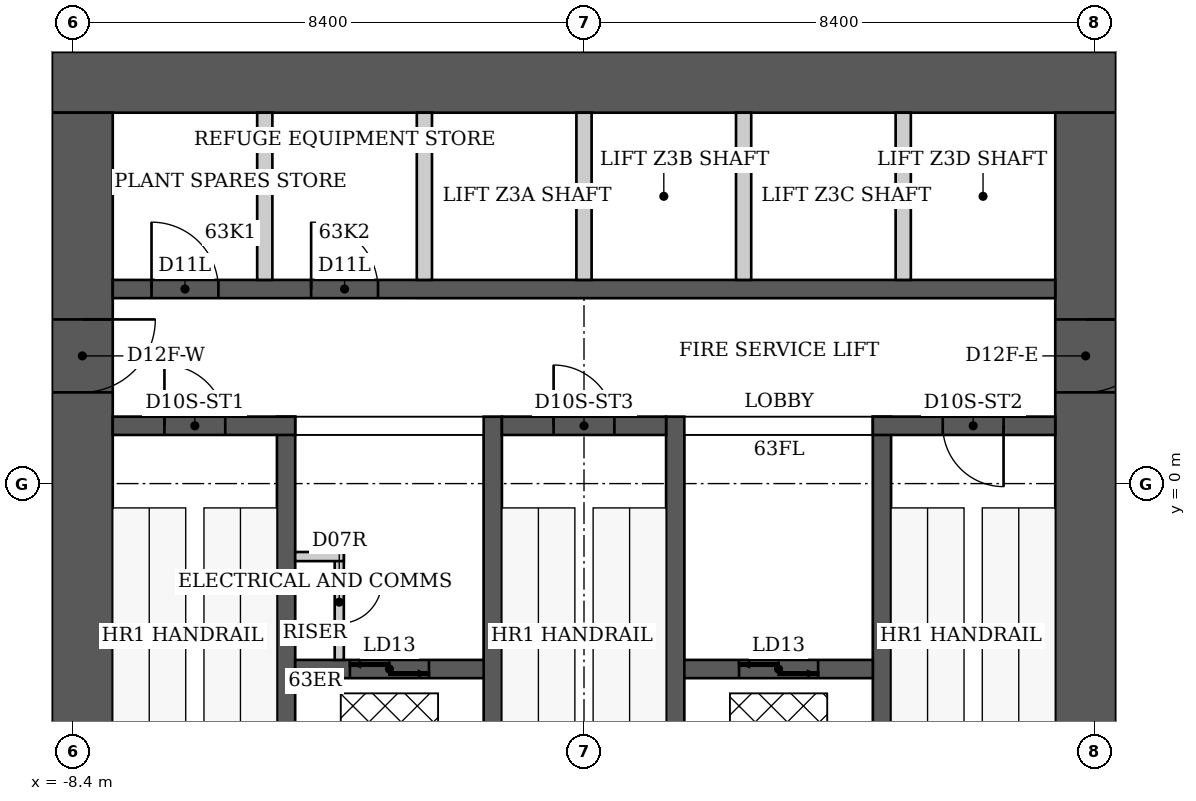
"""IFC4 building model, lengths in metres.
Left out: names, types, materials, properties, quantities, classifications, styles, units other than length and angle.
Written with IfcOpenShell. Run it as: python <this file> out.ifc"""

import sys

from ifc_helpers import new_model, si_unit, direction, frame, frame_2d, origin, place, context, subcontext, project, spatial, rectangle, extrude, element, fill, save


model = new_model("IFC4")
c1 = context("Model", 3, precision=1e-05, world=origin(), true_north=direction((0.0, 1.0)))
c2 = subcontext(c1, "Body", "Model", "MODEL_VIEW")
j1 = project(units=[si_unit("LENGTHUNIT", "METRE"), si_unit("PLANEANGLEUNIT", "RADIAN")], contexts=[c1])
p1 = place(None, origin())
s1 = spatial("IfcSite", under=j1, at=p1, CompositionType="ELEMENT")
p2 = place(p1, origin())
s2 = spatial("IfcBuilding", under=s1, at=p2, CompositionType="ELEMENT")
p3 = place(p2, frame((0.0, 0.0, 251.6)))
s3 = spatial("IfcBuildingStorey", under=s2, at=p3, CompositionType="ELEMENT", Elevation=251.6)
p4 = place(p3, frame((-8.75, 6.6, 0.0), z_axis=(0.0, 0.0, 1.0), x_axis=(1.0, 0.0, 0.0)))
e1 = element("IfcWall", 1, at=p4, inside=s3, PredefinedType="SHEAR", context=c2, shape_type="SweptSolid", body=[
    extrude(rectangle(XDim=17.5, YDim=1.0, at=frame_2d((8.75, 0.0))), origin(), (0.0, 0.0, 1.0), 5.4),
])
p5 = place(p3, frame((-8.25, -6.1, 0.0), z_axis=(0.0, 0.0, 1.0), x_axis=(0.0, 1.0, 0.0)))
e2 = element("IfcWall", 2, at=p5, inside=s3, PredefinedType="SHEAR", context=c2, shape_type="SweptSolid", body=[
    extrude(rectangle(XDim=12.2, YDim=1.0, at=frame_2d((6.1, 0.0))), origin(), (0.0, 0.0, 1.0), 5.4),
])
p6 = place(p5, frame((7.6, 0.0, 0.0)))
e3 = element("IfcOpeningElement", 3, at=p6, cuts=e2, PredefinedType="OPENING", context=c2, shape_type="SweptSolid", body=[
    extrude(rectangle(XDim=1.2, YDim=2.2, at=frame_2d((0.6, 1.1))), frame((0.0, 0.5, 0.0), z_axis=(0.0, -1.0, 0.0), x_axis=(1.0, 0.0, 0.0)), (0.0, 0.0, 1.0), 1.0),
])
p7 = place(p3, frame((8.25, -6.1, 0.0), z_axis=(0.0, 0.0, 1.0), x_axis=(0.0, 1.0, 0.0)))
e4 = element("IfcWall", 4, at=p7, inside=s3, PredefinedType="SHEAR", context=c2, shape_type="SweptSolid", body=[
    extrude(rectangle(XDim=12.2, YDim=1.0, at=frame_2d((6.1, 0.0))), origin(), (0.0, 0.0, 1.0), 5.4),
])
p8 = place(p7, frame((7.6, 0.0, 0.0)))
e5 = element("IfcOpeningElement", 5, at=p8, cuts=e4, PredefinedType="OPENING", context=c2, shape_type="SweptSolid", body=[
    extrude(rectangle(XDim=1.2, YDim=2.2, at=frame_2d((0.6, 1.1))), frame((0.0, 0.5, 0.0), z_axis=(0.0, -1.0, 0.0), x_axis=(1.0, 0.0, 0.0)), (0.0, 0.0, 1.0), 1.0),
])
for number, where, z_axis, x_axis in (
    (6, (-4.9, -6.1, 0.0), (0.0, 0.0, 1.0), (0.0, 1.0, 0.0)),
    (7, (-1.5, -6.1, 0.0), (0.0, 0.0, 1.0), (0.0, 1.0, 0.0)),
    (8, (1.5, -6.1, 0.0), (0.0, 0.0, 1.0), (0.0, 1.0, 0.0)),
    (9, (4.9, -6.1, 0.0), (0.0, 0.0, 1.0), (0.0, 1.0, 0.0)),
):
    element("IfcWall", number, at=place(p3, frame(where, z_axis=z_axis, x_axis=x_axis)), inside=s3, PredefinedType="SHEAR", context=c2, shape_type="SweptSolid", body=[
        extrude(rectangle(XDim=7.2, YDim=0.3, at=frame_2d((3.6, 0.0))), origin(), (0.0, 0.0, 1.0), 5.4),
    ])
p9 = place(p3, frame((-7.75, 0.95, 0.0), z_axis=(0.0, 0.0, 1.0), x_axis=(1.0, 0.0, 0.0)))
e10 = element("IfcWall", 10, at=p9, inside=s3, PredefinedType="SHEAR", context=c2, shape_type="SweptSolid", body=[
    extrude(rectangle(XDim=3.0, YDim=0.3, at=frame_2d((1.5, 0.0))), origin(), (0.0, 0.0, 1.0), 5.4),
])
p10 = place(p9, frame((0.85, 0.0, 0.0)))
e11 = element("IfcOpeningElement", 11, at=p10, cuts=e10, PredefinedType="OPENING", context=c2, shape_type="SweptSolid", body=[
    extrude(rectangle(XDim=1.0, YDim=2.2, at=frame_2d((0.5, 1.1))), frame((0.0, 0.15, 0.0), z_axis=(0.0, -1.0, 0.0), x_axis=(1.0, 0.0, 0.0)), (0.0, 0.0, 1.0), 0.3),
])
p11 = place(p3, frame((-1.35, 0.95, 0.0), z_axis=(0.0, 0.0, 1.0), x_axis=(1.0, 0.0, 0.0)))
e12 = element("IfcWall", 12, at=p11, inside=s3, PredefinedType="SHEAR", context=c2, shape_type="SweptSolid", body=[
    extrude(rectangle(XDim=2.7, YDim=0.3, at=frame_2d((1.35, 0.0))), origin(), (0.0, 0.0, 1.0), 5.4),
])
p12 = place(p11, frame((0.85, 0.0, 0.0)))
e13 = element("IfcOpeningElement", 13, at=p12, cuts=e12, PredefinedType="OPENING", context=c2, shape_type="SweptSolid", body=[
    extrude(rectangle(XDim=1.0, YDim=2.2, at=frame_2d((0.5, 1.1))), frame((0.0, 0.15, 0.0), z_axis=(0.0, -1.0, 0.0), x_axis=(1.0, 0.0, 0.0)), (0.0, 0.0, 1.0), 0.3),
])
p13 = place(p3, frame((4.75, 0.95, 0.0), z_axis=(0.0, 0.0, 1.0), x_axis=(1.0, 0.0, 0.0)))
e14 = element("IfcWall", 14, at=p13, inside=s3, PredefinedType="SHEAR", context=c2, shape_type="SweptSolid", body=[
    extrude(rectangle(XDim=3.0, YDim=0.3, at=frame_2d((1.5, 0.0))), origin(), (0.0, 0.0, 1.0), 5.4),
])
p14 = place(p13, frame((1.15, 0.0, 0.0)))
e15 = element("IfcOpeningElement", 15, at=p14, cuts=e14, PredefinedType="OPENING", context=c2, shape_type="SweptSolid", body=[
    extrude(rectangle(XDim=1.0, YDim=2.2, at=frame_2d((0.5, 1.1))), frame((0.0, 0.15, 0.0), z_axis=(0.0, -1.0, 0.0), x_axis=(1.0, 0.0, 0.0)), (0.0, 0.0, 1.0), 0.3),
])
p15 = place(p3, frame((-4.75, -3.05, 0.0), z_axis=(0.0, 0.0, 1.0), x_axis=(1.0, 0.0, 0.0)))
e16 = element("IfcWall", 16, at=p15, inside=s3, PredefinedType="SHEAR", context=c2, shape_type="SweptSolid", body=[
    extrude(rectangle(XDim=3.1, YDim=0.3, at=frame_2d((1.55, 0.0))), origin(), (0.0, 0.0, 1.0), 5.4),
])
p16 = place(p15, frame((0.9, 0.0, 0.0)))
e17 = element("IfcOpeningElement", 17, at=p16, cuts=e16, PredefinedType="OPENING", context=c2, shape_type="SweptSolid", body=[
    extrude(rectangle(XDim=1.3, YDim=2.1, at=frame_2d((0.65, 1.05))), frame((0.0, 0.15, 0.0), z_axis=(0.0, -1.0, 0.0), x_axis=(1.0, 0.0, 0.0)), (0.0, 0.0, 1.0), 0.3),
])
p17 = place(p3, frame((1.65, -3.05, 0.0), z_axis=(0.0, 0.0, 1.0), x_axis=(1.0, 0.0, 0.0)))
e18 = element("IfcWall", 18, at=p17, inside=s3, PredefinedType="SHEAR", context=c2, shape_type="SweptSolid", body=[
    extrude(rectangle(XDim=3.1, YDim=0.3, at=frame_2d((1.55, 0.0))), origin(), (0.0, 0.0, 1.0), 5.4),
])
p18 = place(p17, frame((0.9, 0.0, 0.0)))
e19 = element("IfcOpeningElement", 19, at=p18, cuts=e18, PredefinedType="OPENING", context=c2, shape_type="SweptSolid", body=[
    extrude(rectangle(XDim=1.3, YDim=2.1, at=frame_2d((0.65, 1.05))), frame((0.0, 0.15, 0.0), z_axis=(0.0, -1.0, 0.0), x_axis=(1.0, 0.0, 0.0)), (0.0, 0.0, 1.0), 0.3),
])
p19 = place(p3, frame((-7.75, 3.2, 0.0), z_axis=(0.0, 0.0, 1.0), x_axis=(1.0, 0.0, 0.0)))
e20 = element("IfcWall", 20, at=p19, inside=s3, PredefinedType="SHEAR", context=c2, shape_type="SweptSolid", body=[
    extrude(rectangle(XDim=15.5, YDim=0.3, at=frame_2d((7.75, 0.0))), origin(), (0.0, 0.0, 1.0), 5.4),
])
p20 = place(p19, frame((0.637, 0.0, 0.0)))
e21 = element("IfcOpeningElement", 21, at=p20, cuts=e20, PredefinedType="OPENING", context=c2, shape_type="SweptSolid", body=[
    extrude(rectangle(XDim=1.1, YDim=2.2, at=frame_2d((0.55, 1.1))), frame((0.0, 0.15, 0.0), z_axis=(0.0, -1.0, 0.0), x_axis=(1.0, 0.0, 0.0)), (0.0, 0.0, 1.0), 0.3),
])
p21 = place(p19, frame((3.262, 0.0, 0.0)))
e22 = element("IfcOpeningElement", 22, at=p21, cuts=e20, PredefinedType="OPENING", context=c2, shape_type="SweptSolid", body=[
    extrude(rectangle(XDim=1.1, YDim=2.2, at=frame_2d((0.55, 1.1))), frame((0.0, 0.15, 0.0), z_axis=(0.0, -1.0, 0.0), x_axis=(1.0, 0.0, 0.0)), (0.0, 0.0, 1.0), 0.3),
])
for number, where, z_axis, x_axis in (
    (23, (-5.25, 3.35, 0.0), (0.0, 0.0, 1.0), (0.0, 1.0, 0.0)),
    (24, (-2.625, 3.35, 0.0), (0.0, 0.0, 1.0), (0.0, 1.0, 0.0)),
    (25, (0.0, 3.35, 0.0), (0.0, 0.0, 1.0), (0.0, 1.0, 0.0)),
    (26, (2.625, 3.35, 0.0), (0.0, 0.0, 1.0), (0.0, 1.0, 0.0)),
    (27, (5.25, 3.35, 0.0), (0.0, 0.0, 1.0), (0.0, 1.0, 0.0)),
):
    element("IfcWall", number, at=place(p3, frame(where, z_axis=z_axis, x_axis=x_axis)), inside=s3, PredefinedType="PARTITIONING", context=c2, shape_type="SweptSolid", body=[
        extrude(rectangle(XDim=2.75, YDim=0.25, at=frame_2d((1.375, 0.0))), origin(), (0.0, 0.0, 1.0), 5.4),
    ])
p22 = place(p3, frame((-4.025, -2.9, 0.0), z_axis=(0.0, 0.0, 1.0), x_axis=(0.0, 1.0, 0.0)))
e28 = element("IfcWall", 28, at=p22, inside=s3, PredefinedType="PARTITIONING", context=c2, shape_type="SweptSolid", body=[
    extrude(rectangle(XDim=1.775, YDim=0.15, at=frame_2d((0.887, 0.0))), origin(), (0.0, 0.0, 1.0), 5.24),
])
p23 = place(p22, frame((0.6, 0.0, 0.0)))
e29 = element("IfcOpeningElement", 29, at=p23, cuts=e28, PredefinedType="OPENING", context=c2, shape_type="SweptSolid", body=[
    extrude(rectangle(XDim=0.7, YDim=2.1, at=frame_2d((0.35, 1.05))), frame((0.0, 0.075, 0.0), z_axis=(0.0, -1.0, 0.0), x_axis=(1.0, 0.0, 0.0)), (0.0, 0.0, 1.0), 0.15),
])
p24 = place(p3, frame((-4.75, -1.2, 0.0), z_axis=(0.0, 0.0, 1.0), x_axis=(1.0, 0.0, 0.0)))
e30 = element("IfcWall", 30, at=p24, inside=s3, PredefinedType="PARTITIONING", context=c2, shape_type="SweptSolid", body=[
    extrude(rectangle(XDim=0.8, YDim=0.15, at=frame_2d((0.4, 0.0))), origin(), (0.0, 0.0, 1.0), 5.24),
])
p25 = place(p10, origin())
e31 = element("IfcDoor", 31, at=p25, inside=s3, OperationType="SINGLE_SWING_LEFT", PredefinedType="DOOR", context=c2, shape_type="SweptSolid", body=[
    extrude(rectangle(XDim=1.0, YDim=2.2, at=frame_2d((0.5, 1.1))), frame((0.0, 0.025, 0.0), z_axis=(0.0, -1.0, 0.0), x_axis=(1.0, 0.0, 0.0)), (0.0, 0.0, 1.0), 0.05),
])
fill(e11, e31)
p26 = place(p12, origin())
e32 = element("IfcDoor", 32, at=p26, inside=s3, OperationType="SINGLE_SWING_LEFT", PredefinedType="DOOR", context=c2, shape_type="SweptSolid", body=[
    extrude(rectangle(XDim=1.0, YDim=2.2, at=frame_2d((0.5, 1.1))), frame((0.0, 0.025, 0.0), z_axis=(0.0, -1.0, 0.0), x_axis=(1.0, 0.0, 0.0)), (0.0, 0.0, 1.0), 0.05),
])
fill(e13, e32)
p27 = place(p14, origin())
e33 = element("IfcDoor", 33, at=p27, inside=s3, OperationType="SINGLE_SWING_RIGHT", PredefinedType="DOOR", context=c2, shape_type="SweptSolid", body=[
    extrude(rectangle(XDim=1.0, YDim=2.2, at=frame_2d((0.5, 1.1))), frame((0.0, 0.025, 0.0), z_axis=(0.0, -1.0, 0.0), x_axis=(1.0, 0.0, 0.0)), (0.0, 0.0, 1.0), 0.05),
])
fill(e15, e33)
p28 = place(p6, origin())
e34 = element("IfcDoor", 34, at=p28, inside=s3, OperationType="SINGLE_SWING_RIGHT", PredefinedType="DOOR", context=c2, shape_type="SweptSolid", body=[
    extrude(rectangle(XDim=1.2, YDim=2.2, at=frame_2d((0.6, 1.1))), frame((0.0, 0.025, 0.0), z_axis=(0.0, -1.0, 0.0), x_axis=(1.0, 0.0, 0.0)), (0.0, 0.0, 1.0), 0.05),
])
fill(e3, e34)
p29 = place(p8, origin())
e35 = element("IfcDoor", 35, at=p29, inside=s3, OperationType="SINGLE_SWING_RIGHT", PredefinedType="DOOR", context=c2, shape_type="SweptSolid", body=[
    extrude(rectangle(XDim=1.2, YDim=2.2, at=frame_2d((0.6, 1.1))), frame((0.0, 0.025, 0.0), z_axis=(0.0, -1.0, 0.0), x_axis=(1.0, 0.0, 0.0)), (0.0, 0.0, 1.0), 0.05),
])
fill(e5, e35)
p30 = place(p23, origin())
e36 = element("IfcDoor", 36, at=p30, inside=s3, OperationType="SINGLE_SWING_RIGHT", PredefinedType="DOOR", context=c2, shape_type="SweptSolid", body=[
    extrude(rectangle(XDim=0.7, YDim=2.1, at=frame_2d((0.35, 1.05))), frame((0.0, 0.025, 0.0), z_axis=(0.0, -1.0, 0.0), x_axis=(1.0, 0.0, 0.0)), (0.0, 0.0, 1.0), 0.05),
])
fill(e29, e36)
p31 = place(p20, origin())
e37 = element("IfcDoor", 37, at=p31, inside=s3, OperationType="SINGLE_SWING_LEFT", PredefinedType="DOOR", context=c2, shape_type="SweptSolid", body=[
    extrude(rectangle(XDim=1.1, YDim=2.2, at=frame_2d((0.55, 1.1))), frame((0.0, 0.025, 0.0), z_axis=(0.0, -1.0, 0.0), x_axis=(1.0, 0.0, 0.0)), (0.0, 0.0, 1.0), 0.05),
])
fill(e21, e37)
p32 = place(p21, origin())
e38 = element("IfcDoor", 38, at=p32, inside=s3, OperationType="SINGLE_SWING_LEFT", PredefinedType="DOOR", context=c2, shape_type="SweptSolid", body=[
    extrude(rectangle(XDim=1.1, YDim=2.2, at=frame_2d((0.55, 1.1))), frame((0.0, 0.025, 0.0), z_axis=(0.0, -1.0, 0.0), x_axis=(1.0, 0.0, 0.0)), (0.0, 0.0, 1.0), 0.05),
])
fill(e22, e38)
p33 = place(p16, origin())
e39 = element("IfcDoor", 39, at=p33, inside=s3, OperationType="DOUBLE_DOOR_SLIDING", PredefinedType="DOOR", context=c2, shape_type="SweptSolid", body=[
    extrude(rectangle(XDim=1.3, YDim=2.1, at=frame_2d((0.65, 1.05))), frame((0.0, 0.025, 0.0), z_axis=(0.0, -1.0, 0.0), x_axis=(1.0, 0.0, 0.0)), (0.0, 0.0, 1.0), 0.05),
])
fill(e17, e39)
p34 = place(p18, origin())
e40 = element("IfcDoor", 40, at=p34, inside=s3, OperationType="DOUBLE_DOOR_SLIDING", PredefinedType="DOOR", context=c2, shape_type="SweptSolid", body=[
    extrude(rectangle(XDim=1.3, YDim=2.1, at=frame_2d((0.65, 1.05))), frame((0.0, 0.025, 0.0), z_axis=(0.0, -1.0, 0.0), x_axis=(1.0, 0.0, 0.0)), (0.0, 0.0, 1.0), 0.05),
])
fill(e19, e40)
save(model, sys.argv[1])
